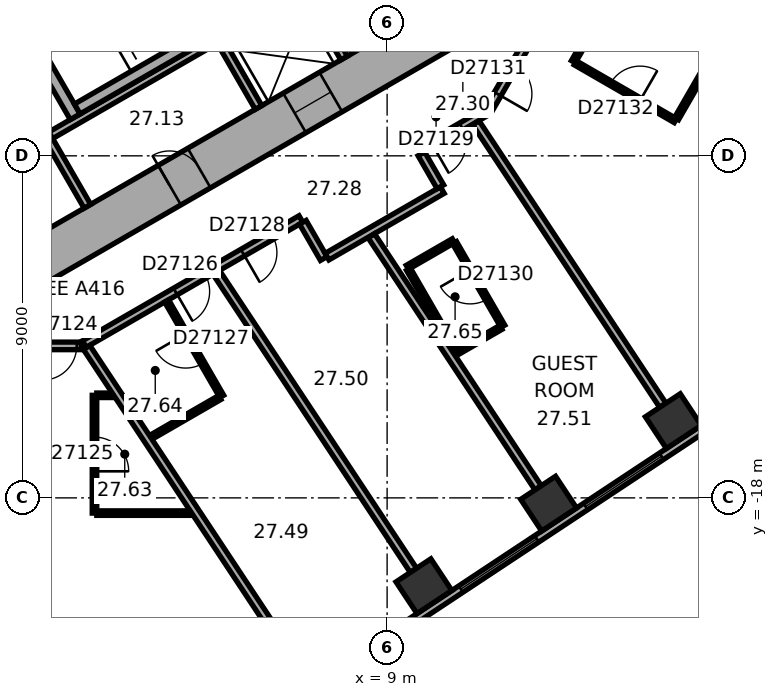
"""IFC4 building model, lengths in metres.
Left out: names, types, materials, properties, quantities, classifications, styles, units other than length and angle.
Written with IfcOpenShell. Run it as: python <this file> out.ifc"""

import sys

from ifc_helpers import new_model, si_unit, direction, frame, frame_2d, origin, origin_2d, place, context, subcontext, project, spatial, rectangle, extrude, element, fill, save


model = new_model("IFC4")
c1 = context("Model", 3, precision=1e-05, world=origin(), true_north=direction((0.0, 1.0)))
c2 = subcontext(c1, "Body", "Model", "MODEL_VIEW")
j1 = project(units=[si_unit("LENGTHUNIT", "METRE"), si_unit("PLANEANGLEUNIT", "RADIAN")], contexts=[c1])
p1 = place(None, origin())
s1 = spatial("IfcSite", under=j1, at=p1, CompositionType="ELEMENT")
p2 = place(p1, origin())
s2 = spatial("IfcBuilding", under=s1, at=p2, CompositionType="ELEMENT")
p3 = place(p2, frame((0.0, 0.0, 113.3)))
s3 = spatial("IfcBuildingStorey", under=s2, at=p3, CompositionType="ELEMENT", Elevation=113.3)
for number, where, z_axis, x_axis in (
    (1, (9.969, -20.324, 0.0), (0.0, 0.0, 1.0), (0.834, 0.552, 0.0)),
    (2, (13.25, -18.152, 0.0), (0.0, 0.0, 1.0), (0.834, 0.552, 0.0)),
    (3, (16.531, -15.981, 0.0), (0.0, 0.0, 1.0), (0.834, 0.552, 0.0)),
):
    element("IfcColumn", number, at=place(p3, frame(where, z_axis=z_axis, x_axis=x_axis)), inside=s3, PredefinedType="COLUMN", context=c2, shape_type="SweptSolid", body=[
        extrude(rectangle(XDim=1.1, YDim=1.0, at=origin_2d()), origin(), (0.0, 0.0, 1.0), 3.3),
    ])
p4 = place(p3, frame((-10.4, -5.658, 0.0), z_axis=(0.0, 0.0, 1.0), x_axis=(0.866021384402, -0.500006961711, 0.0)))
e4 = element("IfcWall", 4, at=p4, inside=s3, PredefinedType="SHEAR", context=c2, shape_type="SweptSolid", body=[
    extrude(rectangle(XDim=12.355, YDim=1.2, at=frame_2d((6.178, 0.0))), origin(), (0.0, 0.0, 1.0), 3.3),
])
p5 = place(p4, frame((6.378, 0.0, 0.0)))
e5 = element("IfcOpeningElement", 5, at=p5, cuts=e4, PredefinedType="OPENING", context=c2, shape_type="SweptSolid", body=[
    extrude(rectangle(XDim=1.5, YDim=2.1, at=frame_2d((0.75, 1.05))), frame((0.0, 0.61, 0.0), z_axis=(0.0, -1.0, 0.0), x_axis=(1.0, 0.0, 0.0)), (0.0, 0.0, 1.0), 1.22),
])
p6 = place(p4, frame((3.228, 0.0, 0.0)))
e6 = element("IfcOpeningElement", 6, at=p6, cuts=e4, PredefinedType="OPENING", context=c2, shape_type="SweptSolid", body=[
    extrude(rectangle(XDim=0.9, YDim=2.1, at=frame_2d((0.45, 1.05))), frame((0.0, 0.61, 0.0), z_axis=(0.0, -1.0, 0.0), x_axis=(1.0, 0.0, 0.0)), (0.0, 0.0, 1.0), 1.22),
])
p7 = place(p3, frame((-0.3, -11.836, 0.0), z_axis=(0.0, 0.0, 1.0), x_axis=(0.866021384402, 0.500006961711, 0.0)))
e7 = element("IfcWall", 7, at=p7, inside=s3, PredefinedType="SHEAR", context=c2, shape_type="SweptSolid", body=[
    extrude(rectangle(XDim=12.355, YDim=1.2, at=frame_2d((6.178, 0.0))), origin(), (0.0, 0.0, 1.0), 3.3),
])
p8 = place(p7, frame((4.128, 0.0, 0.0)))
e8 = element("IfcOpeningElement", 8, at=p8, cuts=e7, PredefinedType="OPENING", context=c2, shape_type="SweptSolid", body=[
    extrude(rectangle(XDim=0.9, YDim=2.1, at=frame_2d((0.45, 1.05))), frame((0.0, 0.61, 0.0), z_axis=(0.0, -1.0, 0.0), x_axis=(1.0, 0.0, 0.0)), (0.0, 0.0, 1.0), 1.22),
])
p9 = place(p7, frame((7.928, 0.0, 0.0)))
e9 = element("IfcOpeningElement", 9, at=p9, cuts=e7, PredefinedType="OPENING", context=c2, shape_type="SweptSolid", body=[
    extrude(rectangle(XDim=1.1, YDim=2.1, at=frame_2d((0.55, 1.05))), frame((0.0, 0.61, 0.0), z_axis=(0.0, -1.0, 0.0), x_axis=(1.0, 0.0, 0.0)), (0.0, 0.0, 1.0), 1.22),
])
p10 = place(p3, frame((3.083, -25.601, 0.0), z_axis=(0.0, 0.0, 1.0), x_axis=(0.833884295743, 0.551939291329, 0.0)))
e10 = element("IfcWall", 10, at=p10, inside=s3, PredefinedType="STANDARD", context=c2, shape_type="SweptSolid", body=[
    extrude(rectangle(XDim=21.246, YDim=0.2, at=frame_2d((10.623, 0.0))), origin(), (0.0, 0.0, 1.0), 3.3),
])
p11 = place(p10, frame((1.553, 0.0, 0.8)))
e11 = element("IfcOpeningElement", 11, at=p11, cuts=e10, PredefinedType="OPENING", context=c2, shape_type="SweptSolid", body=[
    extrude(rectangle(XDim=2.4, YDim=1.7, at=frame_2d((1.2, 0.85))), frame((0.0, 0.11, 0.0), z_axis=(0.0, -1.0, 0.0), x_axis=(1.0, 0.0, 0.0)), (0.0, 0.0, 1.0), 0.22),
])
p12 = place(p10, frame((5.488, 0.0, 0.8)))
e12 = element("IfcOpeningElement", 12, at=p12, cuts=e10, PredefinedType="OPENING", context=c2, shape_type="SweptSolid", body=[
    extrude(rectangle(XDim=2.4, YDim=1.7, at=frame_2d((1.2, 0.85))), frame((0.0, 0.11, 0.0), z_axis=(0.0, -1.0, 0.0), x_axis=(1.0, 0.0, 0.0)), (0.0, 0.0, 1.0), 0.22),
])
p13 = place(p10, frame((9.422, 0.0, 0.8)))
e13 = element("IfcOpeningElement", 13, at=p13, cuts=e10, PredefinedType="OPENING", context=c2, shape_type="SweptSolid", body=[
    extrude(rectangle(XDim=2.4, YDim=1.7, at=frame_2d((1.2, 0.85))), frame((0.0, 0.11, 0.0), z_axis=(0.0, -1.0, 0.0), x_axis=(1.0, 0.0, 0.0)), (0.0, 0.0, 1.0), 0.22),
])
p14 = place(p10, frame((13.357, 0.0, 0.8)))
e14 = element("IfcOpeningElement", 14, at=p14, cuts=e10, PredefinedType="OPENING", context=c2, shape_type="SweptSolid", body=[
    extrude(rectangle(XDim=2.4, YDim=1.7, at=frame_2d((1.2, 0.85))), frame((0.0, 0.11, 0.0), z_axis=(0.0, -1.0, 0.0), x_axis=(1.0, 0.0, 0.0)), (0.0, 0.0, 1.0), 0.22),
])
p15 = place(p10, frame((17.291, 0.0, 0.8)))
e15 = element("IfcOpeningElement", 15, at=p15, cuts=e10, PredefinedType="OPENING", context=c2, shape_type="SweptSolid", body=[
    extrude(rectangle(XDim=2.4, YDim=1.7, at=frame_2d((1.2, 0.85))), frame((0.0, 0.11, 0.0), z_axis=(0.0, -1.0, 0.0), x_axis=(1.0, 0.0, 0.0)), (0.0, 0.0, 1.0), 0.22),
])
p16 = place(p3, frame((-0.024, -8.559, 0.0), z_axis=(0.0, 0.0, 1.0), x_axis=(0.866026010844, 0.49999894854, 0.0)))
e16 = element("IfcWall", 16, at=p16, inside=s3, PredefinedType="PARTITIONING", context=c2, shape_type="SweptSolid", body=[
    extrude(rectangle(XDim=8.0, YDim=0.2, at=frame_2d((4.0, 0.0))), origin(), (0.0, 0.0, 1.0), 3.05),
])
for number, where, z_axis, x_axis in (
    (17, (0.013, -8.422, 0.0), (0.0, 0.0, 1.0), (0.5, -0.866, 0.0)),
    (18, (4.516, -5.822, 0.0), (0.0, 0.0, 1.0), (0.5, -0.866, 0.0)),
    (19, (6.768, -4.522, 0.0), (0.0, 0.0, 1.0), (0.5, -0.866, 0.0)),
):
    element("IfcWall", number, at=place(p3, frame(where, z_axis=z_axis, x_axis=x_axis)), inside=s3, PredefinedType="PARTITIONING", context=c2, shape_type="SweptSolid", body=[
        extrude(rectangle(XDim=2.2, YDim=0.2, at=frame_2d((1.1, 0.0))), origin(), (0.0, 0.0, 1.0), 3.05),
    ])
p17 = place(p3, frame((-1.558, -3.902, 0.0), z_axis=(0.0, 0.0, 1.0), x_axis=(0.499977259774, -0.866038532462, 0.0)))
e20 = element("IfcWall", 20, at=p17, inside=s3, PredefinedType="SHEAR", context=c2, shape_type="SweptSolid", body=[
    extrude(rectangle(XDim=4.7, YDim=0.3, at=frame_2d((2.35, 0.0))), origin(), (0.0, 0.0, 1.0), 3.05),
])
p18 = place(p17, frame((0.8, 0.0, 0.0)))
e21 = element("IfcOpeningElement", 21, at=p18, cuts=e20, PredefinedType="OPENING", context=c2, shape_type="SweptSolid", body=[
    extrude(rectangle(XDim=1.2, YDim=2.1, at=frame_2d((0.6, 1.05))), frame((0.0, 0.16, 0.0), z_axis=(0.0, -1.0, 0.0), x_axis=(1.0, 0.0, 0.0)), (0.0, 0.0, 1.0), 0.32),
])
p19 = place(p3, frame((0.847, -7.767, 0.0), z_axis=(0.0, 0.0, 1.0), x_axis=(0.866027801685, 0.499995846692, 0.0)))
e22 = element("IfcWall", 22, at=p19, inside=s3, PredefinedType="SHEAR", context=c2, shape_type="SweptSolid", body=[
    extrude(rectangle(XDim=7.06, YDim=0.3, at=frame_2d((3.53, 0.0))), origin(), (0.0, 0.0, 1.0), 3.05),
])
p20 = place(p3, frame((-0.91, -14.001, 0.0), z_axis=(0.0, 0.0, 1.0), x_axis=(1.0, 0.0, 0.0)))
e23 = element("IfcWall", 23, at=p20, inside=s3, PredefinedType="PARTITIONING", context=c2, shape_type="SweptSolid", body=[
    extrude(rectangle(XDim=1.86, YDim=0.2, at=frame_2d((0.93, 0.0))), origin(), (0.0, 0.0, 1.0), 3.05),
])
p21 = place(p20, frame((0.842, 0.0, 0.0)))
e24 = element("IfcOpeningElement", 24, at=p21, cuts=e23, PredefinedType="OPENING", context=c2, shape_type="SweptSolid", body=[
    extrude(rectangle(XDim=0.9, YDim=2.1, at=frame_2d((0.45, 1.05))), frame((0.0, 0.11, 0.0), z_axis=(0.0, -1.0, 0.0), x_axis=(1.0, 0.0, 0.0)), (0.0, 0.0, 1.0), 0.22),
])
p22 = place(p3, frame((1.033, -13.953, 0.0), z_axis=(0.0, 0.0, 1.0), x_axis=(0.866017531406, 0.500013635111, 0.0)))
e25 = element("IfcWall", 25, at=p22, inside=s3, PredefinedType="PARTITIONING", context=c2, shape_type="SweptSolid", body=[
    extrude(rectangle(XDim=6.58, YDim=0.2, at=frame_2d((3.29, 0.0))), origin(), (0.0, 0.0, 1.0), 3.05),
])
p23 = place(p22, frame((2.767, 0.0, 0.0)))
e26 = element("IfcOpeningElement", 26, at=p23, cuts=e25, PredefinedType="OPENING", context=c2, shape_type="SweptSolid", body=[
    extrude(rectangle(XDim=0.9, YDim=2.1, at=frame_2d((0.45, 1.05))), frame((0.0, 0.11, 0.0), z_axis=(0.0, -1.0, 0.0), x_axis=(1.0, 0.0, 0.0)), (0.0, 0.0, 1.0), 0.22),
])
p24 = place(p22, frame((4.811, 0.0, 0.0)))
e27 = element("IfcOpeningElement", 27, at=p24, cuts=e25, PredefinedType="OPENING", context=c2, shape_type="SweptSolid", body=[
    extrude(rectangle(XDim=0.9, YDim=2.1, at=frame_2d((0.45, 1.05))), frame((0.0, 0.11, 0.0), z_axis=(0.0, -1.0, 0.0), x_axis=(1.0, 0.0, 0.0)), (0.0, 0.0, 1.0), 0.22),
])
p25 = place(p3, frame((1.3, -18.401, 0.0), z_axis=(0.0, 0.0, 1.0), x_axis=(0.0, 1.0, 0.0)))
e28 = element("IfcWall", 28, at=p25, inside=s3, PredefinedType="PARTITIONING", context=c2, shape_type="SweptSolid", body=[
    extrude(rectangle(XDim=3.1, YDim=0.12, at=frame_2d((1.55, 0.0))), origin(), (0.0, 0.0, 1.0), 3.05),
])
p26 = place(p25, frame((1.1, 0.0, 0.0)))
e29 = element("IfcOpeningElement", 29, at=p26, cuts=e28, PredefinedType="OPENING", context=c2, shape_type="SweptSolid", body=[
    extrude(rectangle(XDim=0.9, YDim=2.1, at=frame_2d((0.45, 1.05))), frame((0.0, 0.07, 0.0), z_axis=(0.0, -1.0, 0.0), x_axis=(1.0, 0.0, 0.0)), (0.0, 0.0, 1.0), 0.14),
])
p27 = place(p3, frame((1.36, -15.301, 0.0), z_axis=(0.0, 0.0, 1.0), x_axis=(1.0, 0.0, 0.0)))
e30 = element("IfcWall", 30, at=p27, inside=s3, PredefinedType="PARTITIONING", context=c2, shape_type="SweptSolid", body=[
    extrude(rectangle(XDim=0.416, YDim=0.12, at=frame_2d((0.208, 0.0))), origin(), (0.0, 0.0, 1.0), 3.05),
])
p28 = place(p3, frame((3.198, -12.818, 0.0), z_axis=(0.0, 0.0, 1.0), x_axis=(0.499987231761, -0.866032775405, 0.0)))
e31 = element("IfcWall", 31, at=p28, inside=s3, PredefinedType="PARTITIONING", context=c2, shape_type="SweptSolid", body=[
    extrude(rectangle(XDim=2.9, YDim=0.12, at=frame_2d((1.45, 0.0))), origin(), (0.0, 0.0, 1.0), 3.05),
])
p29 = place(p28, frame((1.0, 0.0, 0.0)))
e32 = element("IfcOpeningElement", 32, at=p29, cuts=e31, PredefinedType="OPENING", context=c2, shape_type="SweptSolid", body=[
    extrude(rectangle(XDim=0.9, YDim=2.1, at=frame_2d((0.45, 1.05))), frame((0.0, 0.07, 0.0), z_axis=(0.0, -1.0, 0.0), x_axis=(1.0, 0.0, 0.0)), (0.0, 0.0, 1.0), 0.14),
])
p30 = place(p3, frame((3.828, -18.401, 0.0), z_axis=(0.0, 0.0, 1.0), x_axis=(-1.0, 0.0, 0.0)))
e33 = element("IfcWall", 33, at=p30, inside=s3, PredefinedType="PARTITIONING", context=c2, shape_type="SweptSolid", body=[
    extrude(rectangle(XDim=2.468, YDim=0.12, at=frame_2d((1.234, 0.0))), origin(), (0.0, 0.0, 1.0), 3.05),
])
p31 = place(p3, frame((4.596, -15.36, 0.0), z_axis=(0.0, 0.0, 1.0), x_axis=(-0.865986006152, -0.500068232493, 0.0)))
e34 = element("IfcWall", 34, at=p31, inside=s3, PredefinedType="PARTITIONING", context=c2, shape_type="SweptSolid", body=[
    extrude(rectangle(XDim=2.098, YDim=0.12, at=frame_2d((1.049, 0.0))), origin(), (0.0, 0.0, 1.0), 3.05),
])
p32 = place(p3, frame((6.412, -22.079, 0.0), z_axis=(0.0, 0.0, 1.0), x_axis=(-0.551919507115, 0.83389739037, 0.0)))
e35 = element("IfcWall", 35, at=p32, inside=s3, PredefinedType="PARTITIONING", context=c2, shape_type="SweptSolid", body=[
    extrude(rectangle(XDim=9.635, YDim=0.2, at=frame_2d((4.817, 0.0))), origin(), (0.0, 0.0, 1.0), 3.05),
])
p33 = place(p3, frame((6.782, -10.749, 0.0), z_axis=(0.0, 0.0, 1.0), x_axis=(0.500074377092, -0.865982457891, 0.0)))
e36 = element("IfcWall", 36, at=p33, inside=s3, PredefinedType="PARTITIONING", context=c2, shape_type="SweptSolid", body=[
    extrude(rectangle(XDim=1.101, YDim=0.2, at=frame_2d((0.55, 0.0))), origin(), (0.0, 0.0, 1.0), 3.05),
])
p34 = place(p3, frame((7.419, -11.653, 0.0), z_axis=(0.0, 0.0, 1.0), x_axis=(0.866038154057, 0.49997791523, 0.0)))
e37 = element("IfcWall", 37, at=p34, inside=s3, PredefinedType="PARTITIONING", context=c2, shape_type="SweptSolid", body=[
    extrude(rectangle(XDim=3.502, YDim=0.2, at=frame_2d((1.751, 0.0))), origin(), (0.0, 0.0, 1.0), 3.05),
])
p35 = place(p3, frame((9.532, -11.934, 0.0), z_axis=(0.0, 0.0, 1.0), x_axis=(0.866034573852, 0.49998411664, 0.0)))
e38 = element("IfcWall", 38, at=p35, inside=s3, PredefinedType="PARTITIONING", context=c2, shape_type="SweptSolid", body=[
    extrude(rectangle(XDim=1.4, YDim=0.12, at=frame_2d((0.7, 0.0))), origin(), (0.0, 0.0, 1.0), 3.05),
])
p36 = place(p3, frame((9.693, -19.907, 0.0), z_axis=(0.0, 0.0, 1.0), x_axis=(-0.551938394837, 0.833884889121, 0.0)))
e39 = element("IfcWall", 39, at=p36, inside=s3, PredefinedType="PARTITIONING", context=c2, shape_type="SweptSolid", body=[
    extrude(rectangle(XDim=9.394, YDim=0.2, at=frame_2d((4.697, 0.0))), origin(), (0.0, 0.0, 1.0), 2.6),
])
p37 = place(p3, frame((9.852, -8.861, 0.0), z_axis=(0.0, 0.0, 1.0), x_axis=(0.866013291437, 0.500020978615, 0.0)))
e40 = element("IfcWall", 40, at=p37, inside=s3, PredefinedType="PARTITIONING", context=c2, shape_type="SweptSolid", body=[
    extrude(rectangle(XDim=2.077, YDim=0.2, at=frame_2d((1.038, 0.0))), origin(), (0.0, 0.0, 1.0), 3.05),
])
p38 = place(p37, frame((0.372, 0.0, 0.0)))
e41 = element("IfcOpeningElement", 41, at=p38, cuts=e40, PredefinedType="OPENING", context=c2, shape_type="SweptSolid", body=[
    extrude(rectangle(XDim=0.9, YDim=2.1, at=frame_2d((0.45, 1.05))), frame((0.0, 0.11, 0.0), z_axis=(0.0, -1.0, 0.0), x_axis=(1.0, 0.0, 0.0)), (0.0, 0.0, 1.0), 0.22),
])
p39 = place(p3, frame((10.402, -9.815, 0.0), z_axis=(0.0, 0.0, 1.0), x_axis=(-0.499968756647, 0.866043441391, 0.0)))
e42 = element("IfcWall", 42, at=p39, inside=s3, PredefinedType="PARTITIONING", context=c2, shape_type="SweptSolid", body=[
    extrude(rectangle(XDim=1.001, YDim=0.2, at=frame_2d((0.5, 0.0))), origin(), (0.0, 0.0, 1.0), 3.05),
])
p40 = place(p3, frame((10.775, -11.286, 0.0), z_axis=(0.0, 0.0, 1.0), x_axis=(0.500046963369, -0.865998287773, 0.0)))
e43 = element("IfcWall", 43, at=p40, inside=s3, PredefinedType="PARTITIONING", context=c2, shape_type="SweptSolid", body=[
    extrude(rectangle(XDim=2.54, YDim=0.12, at=frame_2d((1.27, 0.0))), origin(), (0.0, 0.0, 1.0), 3.05),
])
p41 = place(p40, frame((0.82, 0.0, 0.0)))
e44 = element("IfcOpeningElement", 44, at=p41, cuts=e43, PredefinedType="OPENING", context=c2, shape_type="SweptSolid", body=[
    extrude(rectangle(XDim=0.9, YDim=2.1, at=frame_2d((0.45, 1.05))), frame((0.0, 0.07, 0.0), z_axis=(0.0, -1.0, 0.0), x_axis=(1.0, 0.0, 0.0)), (0.0, 0.0, 1.0), 0.14),
])
p42 = place(p3, frame((10.833, -14.185, 0.0), z_axis=(0.0, 0.0, 1.0), x_axis=(-0.500005339912, 0.866022320763, 0.0)))
e45 = element("IfcWall", 45, at=p42, inside=s3, PredefinedType="PARTITIONING", context=c2, shape_type="SweptSolid", body=[
    extrude(rectangle(XDim=2.54, YDim=0.12, at=frame_2d((1.27, 0.0))), origin(), (0.0, 0.0, 1.0), 3.05),
])
p43 = place(p3, frame((11.67, -7.788, 0.0), z_axis=(0.0, 0.0, 1.0), x_axis=(0.500063286585, 0.865988862174, 0.0)))
e46 = element("IfcWall", 46, at=p43, inside=s3, PredefinedType="PARTITIONING", context=c2, shape_type="SweptSolid", body=[
    extrude(rectangle(XDim=1.86, YDim=0.2, at=frame_2d((0.93, 0.0))), origin(), (0.0, 0.0, 1.0), 3.05),
])
p44 = place(p43, frame((0.48, 0.0, 0.0)))
e47 = element("IfcOpeningElement", 47, at=p44, cuts=e46, PredefinedType="OPENING", context=c2, shape_type="SweptSolid", body=[
    extrude(rectangle(XDim=0.9, YDim=2.1, at=frame_2d((0.45, 1.05))), frame((0.0, 0.11, 0.0), z_axis=(0.0, -1.0, 0.0), x_axis=(1.0, 0.0, 0.0)), (0.0, 0.0, 1.0), 0.22),
])
p45 = place(p3, frame((11.993, -13.515, 0.0), z_axis=(0.0, 0.0, 1.0), x_axis=(-0.865956862152, -0.500118698802, 0.0)))
e48 = element("IfcWall", 48, at=p45, inside=s3, PredefinedType="PARTITIONING", context=c2, shape_type="SweptSolid", body=[
    extrude(rectangle(XDim=1.28, YDim=0.12, at=frame_2d((0.64, 0.0))), origin(), (0.0, 0.0, 1.0), 3.05),
])
p46 = place(p3, frame((12.974, -17.735, 0.0), z_axis=(0.0, 0.0, 1.0), x_axis=(-0.55192625685, 0.833892922982, 0.0)))
e49 = element("IfcWall", 49, at=p46, inside=s3, PredefinedType="PARTITIONING", context=c2, shape_type="SweptSolid", body=[
    extrude(rectangle(XDim=7.95, YDim=0.2, at=frame_2d((3.975, 0.0))), origin(), (0.0, 0.0, 1.0), 3.05),
])
p47 = place(p3, frame((13.901, -6.524, 0.0), z_axis=(0.0, 0.0, 1.0), x_axis=(0.499964162598, 0.86604609353, 0.0)))
e50 = element("IfcWall", 50, at=p47, inside=s3, PredefinedType="PARTITIONING", context=c2, shape_type="SweptSolid", body=[
    extrude(rectangle(XDim=1.661, YDim=0.12, at=frame_2d((0.831, 0.0))), origin(), (0.0, 0.0, 1.0), 3.05),
])
p48 = place(p3, frame((16.255, -15.564, 0.0), z_axis=(0.0, 0.0, 1.0), x_axis=(-0.55192208744, 0.833895682562, 0.0)))
e51 = element("IfcWall", 51, at=p48, inside=s3, PredefinedType="PARTITIONING", context=c2, shape_type="SweptSolid", body=[
    extrude(rectangle(XDim=8.913, YDim=0.2, at=frame_2d((4.457, 0.0))), origin(), (0.0, 0.0, 1.0), 2.6),
])
p49 = place(p3, frame((16.585, -8.074, 0.0), z_axis=(0.0, 0.0, 1.0), x_axis=(-0.86601037836, 0.500026023896, 0.0)))
e52 = element("IfcWall", 52, at=p49, inside=s3, PredefinedType="PARTITIONING", context=c2, shape_type="SweptSolid", body=[
    extrude(rectangle(XDim=3.04, YDim=0.12, at=frame_2d((1.52, 0.0))), origin(), (0.0, 0.0, 1.0), 3.05),
])
p50 = place(p49, frame((1.07, 0.0, 0.0)))
e53 = element("IfcOpeningElement", 53, at=p50, cuts=e52, PredefinedType="OPENING", context=c2, shape_type="SweptSolid", body=[
    extrude(rectangle(XDim=0.9, YDim=2.1, at=frame_2d((0.45, 1.05))), frame((0.0, 0.07, 0.0), z_axis=(0.0, -1.0, 0.0), x_axis=(1.0, 0.0, 0.0)), (0.0, 0.0, 1.0), 0.14),
])
p51 = place(p3, frame((17.906, -5.788, 0.0), z_axis=(0.0, 0.0, 1.0), x_axis=(-0.500047388771, -0.865998042136, 0.0)))
e54 = element("IfcWall", 54, at=p51, inside=s3, PredefinedType="PARTITIONING", context=c2, shape_type="SweptSolid", body=[
    extrude(rectangle(XDim=2.58, YDim=0.12, at=frame_2d((1.29, 0.0))), origin(), (0.0, 0.0, 1.0), 3.05),
])
p52 = place(p13, origin())
e55 = element("IfcWindow", 55, at=p52, inside=s3, PartitioningType="SINGLE_PANEL", PredefinedType="WINDOW", context=c2, shape_type="SweptSolid", body=[
    extrude(rectangle(XDim=2.4, YDim=1.7, at=frame_2d((1.2, 0.85))), frame((0.0, 0.03, 0.0), z_axis=(0.0, -1.0, 0.0), x_axis=(1.0, 0.0, 0.0)), (0.0, 0.0, 1.0), 0.06),
])
fill(e13, e55)
p53 = place(p14, origin())
e56 = element("IfcWindow", 56, at=p53, inside=s3, PartitioningType="SINGLE_PANEL", PredefinedType="WINDOW", context=c2, shape_type="SweptSolid", body=[
    extrude(rectangle(XDim=2.4, YDim=1.7, at=frame_2d((1.2, 0.85))), frame((0.0, 0.03, 0.0), z_axis=(0.0, -1.0, 0.0), x_axis=(1.0, 0.0, 0.0)), (0.0, 0.0, 1.0), 0.06),
])
fill(e14, e56)
p54 = place(p8, origin())
e57 = element("IfcDoor", 57, at=p54, inside=s3, OperationType="SINGLE_SWING_LEFT", PredefinedType="DOOR", context=c2, shape_type="SweptSolid", body=[
    extrude(rectangle(XDim=0.9, YDim=2.1, at=frame_2d((0.45, 1.05))), frame((0.0, 0.025, 0.0), z_axis=(0.0, -1.0, 0.0), x_axis=(1.0, 0.0, 0.0)), (0.0, 0.0, 1.0), 0.05),
])
fill(e8, e57)
p55 = place(p9, origin())
e58 = element("IfcDoor", 58, at=p55, inside=s3, OperationType="DOUBLE_DOOR_SLIDING", PredefinedType="DOOR", context=c2, shape_type="SweptSolid", body=[
    extrude(rectangle(XDim=1.1, YDim=2.1, at=frame_2d((0.55, 1.05))), frame((0.0, 0.025, 0.0), z_axis=(0.0, -1.0, 0.0), x_axis=(1.0, 0.0, 0.0)), (0.0, 0.0, 1.0), 0.05),
])
fill(e9, e58)
p56 = place(p21, origin())
e59 = element("IfcDoor", 59, at=p56, inside=s3, OperationType="SINGLE_SWING_LEFT", PredefinedType="DOOR", context=c2, shape_type="SweptSolid", body=[
    extrude(rectangle(XDim=0.9, YDim=2.1, at=frame_2d((0.45, 1.05))), frame((0.0, 0.025, 0.0), z_axis=(0.0, -1.0, 0.0), x_axis=(1.0, 0.0, 0.0)), (0.0, 0.0, 1.0), 0.05),
])
fill(e24, e59)
p57 = place(p26, origin())
e60 = element("IfcDoor", 60, at=p57, inside=s3, OperationType="SINGLE_SWING_LEFT", PredefinedType="DOOR", context=c2, shape_type="SweptSolid", body=[
    extrude(rectangle(XDim=0.9, YDim=2.1, at=frame_2d((0.45, 1.05))), frame((0.0, 0.025, 0.0), z_axis=(0.0, -1.0, 0.0), x_axis=(1.0, 0.0, 0.0)), (0.0, 0.0, 1.0), 0.05),
])
fill(e29, e60)
p58 = place(p23, origin())
e61 = element("IfcDoor", 61, at=p58, inside=s3, OperationType="SINGLE_SWING_LEFT", PredefinedType="DOOR", context=c2, shape_type="SweptSolid", body=[
    extrude(rectangle(XDim=0.9, YDim=2.1, at=frame_2d((0.45, 1.05))), frame((0.0, 0.025, 0.0), z_axis=(0.0, -1.0, 0.0), x_axis=(1.0, 0.0, 0.0)), (0.0, 0.0, 1.0), 0.05),
])
fill(e26, e61)
p59 = place(p29, origin())
e62 = element("IfcDoor", 62, at=p59, inside=s3, OperationType="SINGLE_SWING_LEFT", PredefinedType="DOOR", context=c2, shape_type="SweptSolid", body=[
    extrude(rectangle(XDim=0.9, YDim=2.1, at=frame_2d((0.45, 1.05))), frame((0.0, 0.025, 0.0), z_axis=(0.0, -1.0, 0.0), x_axis=(1.0, 0.0, 0.0)), (0.0, 0.0, 1.0), 0.05),
])
fill(e32, e62)
p60 = place(p24, origin())
e63 = element("IfcDoor", 63, at=p60, inside=s3, OperationType="SINGLE_SWING_LEFT", PredefinedType="DOOR", context=c2, shape_type="SweptSolid", body=[
    extrude(rectangle(XDim=0.9, YDim=2.1, at=frame_2d((0.45, 1.05))), frame((0.0, 0.025, 0.0), z_axis=(0.0, -1.0, 0.0), x_axis=(1.0, 0.0, 0.0)), (0.0, 0.0, 1.0), 0.05),
])
fill(e27, e63)
p61 = place(p38, origin())
e64 = element("IfcDoor", 64, at=p61, inside=s3, OperationType="SINGLE_SWING_LEFT", PredefinedType="DOOR", context=c2, shape_type="SweptSolid", body=[
    extrude(rectangle(XDim=0.9, YDim=2.1, at=frame_2d((0.45, 1.05))), frame((0.0, 0.025, 0.0), z_axis=(0.0, -1.0, 0.0), x_axis=(1.0, 0.0, 0.0)), (0.0, 0.0, 1.0), 0.05),
])
fill(e41, e64)
p62 = place(p41, origin())
e65 = element("IfcDoor", 65, at=p62, inside=s3, OperationType="SINGLE_SWING_LEFT", PredefinedType="DOOR", context=c2, shape_type="SweptSolid", body=[
    extrude(rectangle(XDim=0.9, YDim=2.1, at=frame_2d((0.45, 1.05))), frame((0.0, 0.025, 0.0), z_axis=(0.0, -1.0, 0.0), x_axis=(1.0, 0.0, 0.0)), (0.0, 0.0, 1.0), 0.05),
])
fill(e44, e65)
p63 = place(p44, origin())
e66 = element("IfcDoor", 66, at=p63, inside=s3, OperationType="SINGLE_SWING_LEFT", PredefinedType="DOOR", context=c2, shape_type="SweptSolid", body=[
    extrude(rectangle(XDim=0.9, YDim=2.1, at=frame_2d((0.45, 1.05))), frame((0.0, 0.025, 0.0), z_axis=(0.0, -1.0, 0.0), x_axis=(1.0, 0.0, 0.0)), (0.0, 0.0, 1.0), 0.05),
])
fill(e47, e66)
p64 = place(p50, origin())
e67 = element("IfcDoor", 67, at=p64, inside=s3, OperationType="SINGLE_SWING_LEFT", PredefinedType="DOOR", context=c2, shape_type="SweptSolid", body=[
    extrude(rectangle(XDim=0.9, YDim=2.1, at=frame_2d((0.45, 1.05))), frame((0.0, 0.025, 0.0), z_axis=(0.0, -1.0, 0.0), x_axis=(1.0, 0.0, 0.0)), (0.0, 0.0, 1.0), 0.05),
])
fill(e53, e67)
save(model, sys.argv[1])
